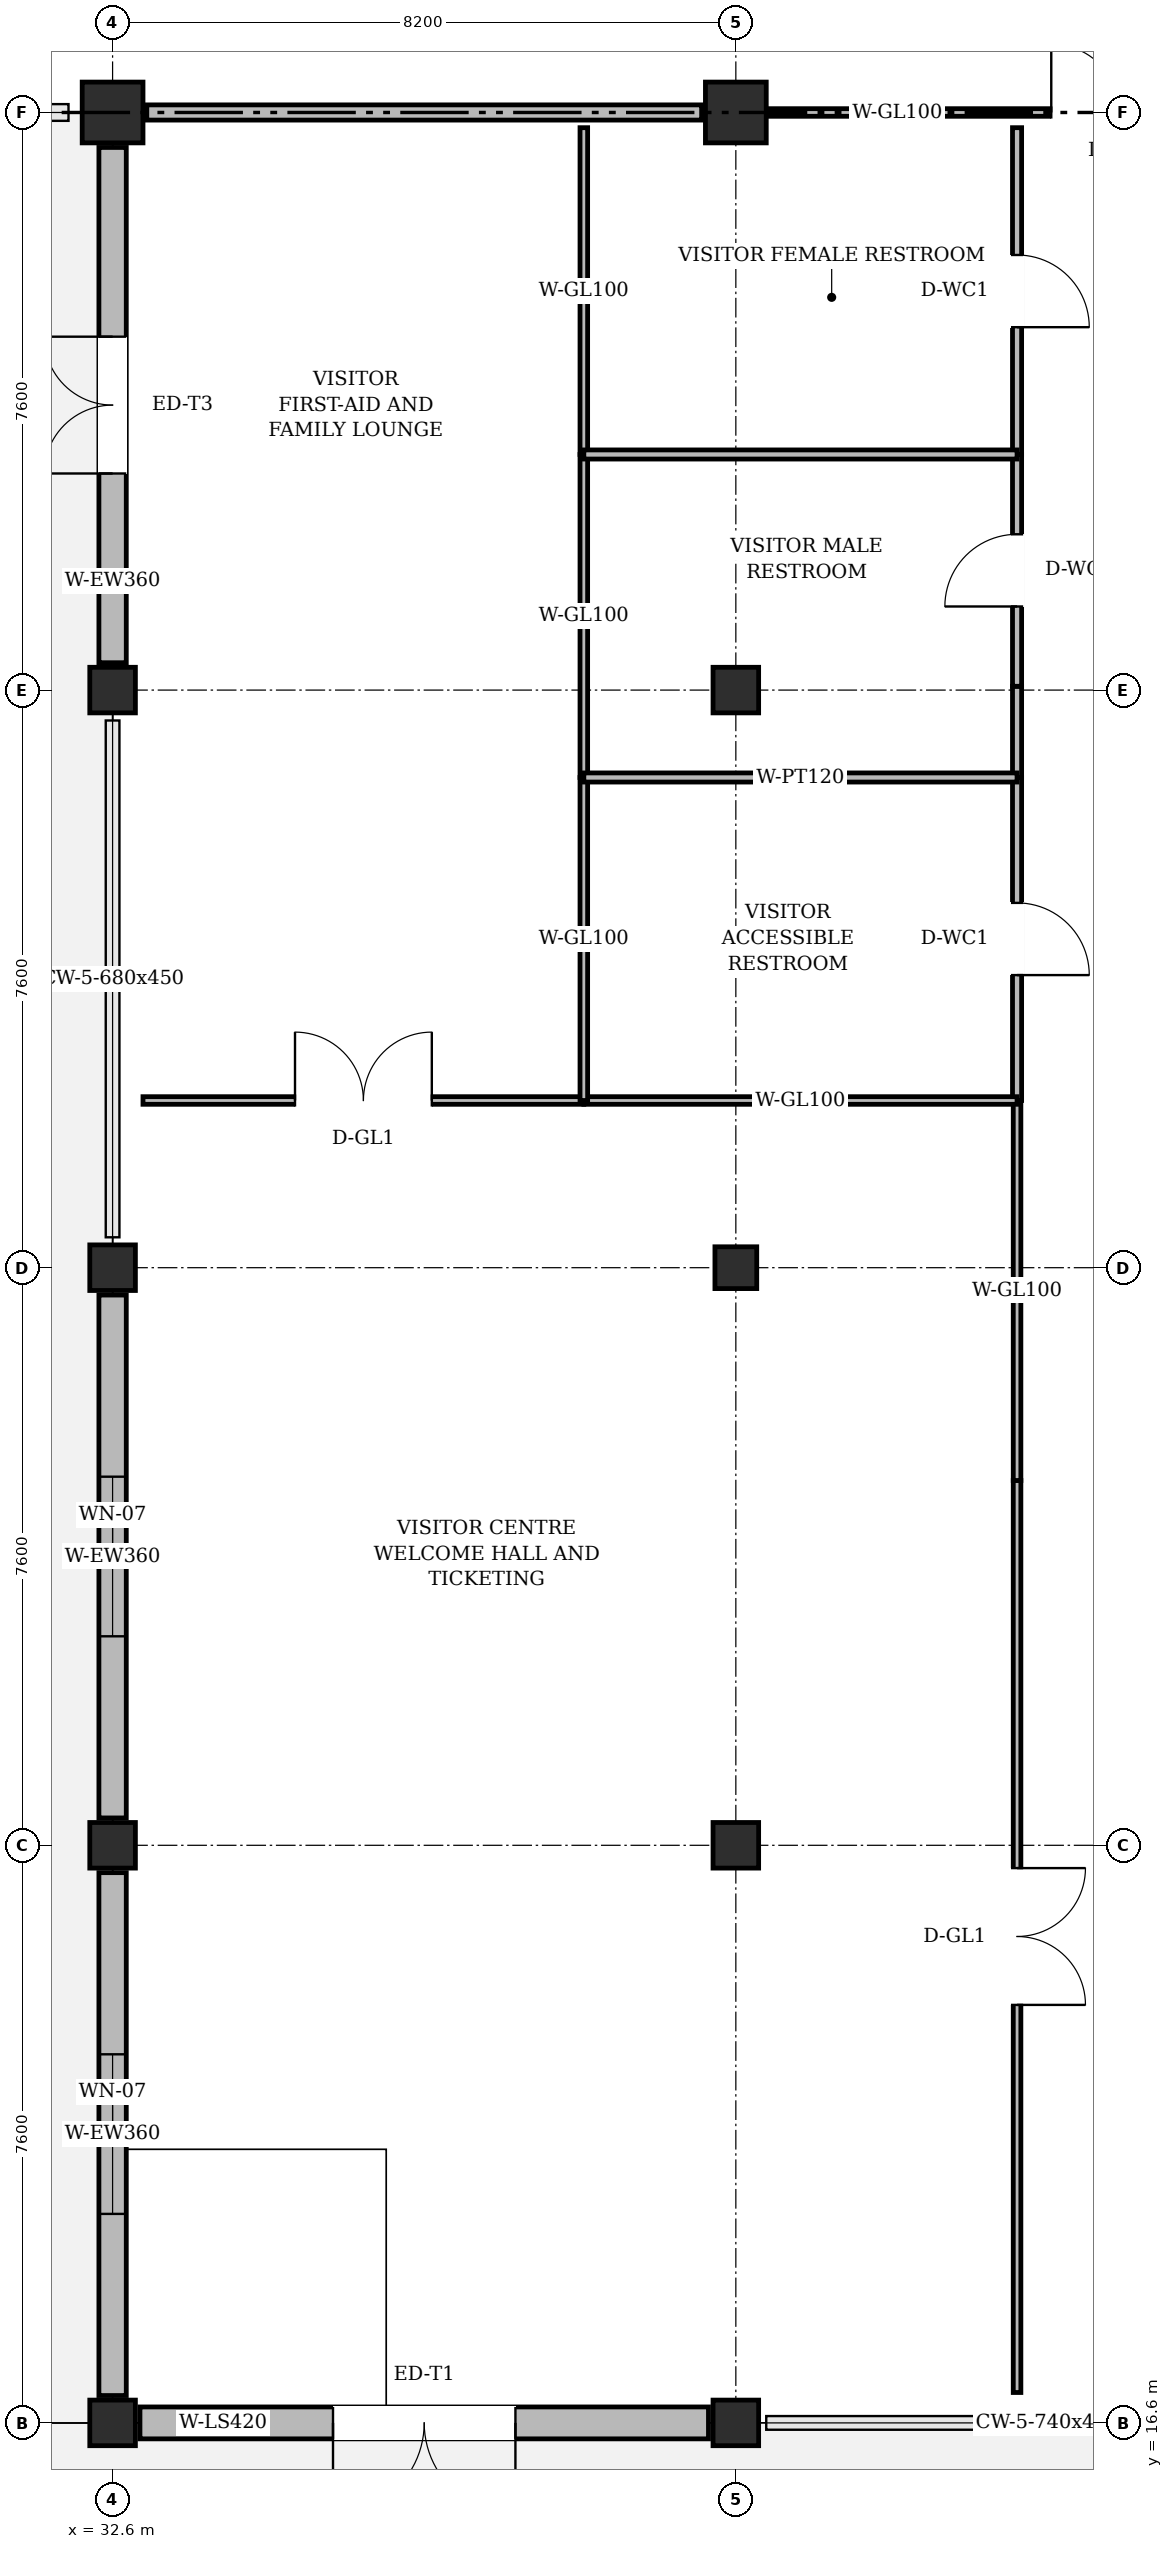
"""IFC4 building model, lengths in metres.
Left out: names, types, materials, properties, quantities, classifications, styles, units other than length and angle.
Written with IfcOpenShell. Run it as: python <this file> out.ifc"""

import sys

from ifc_helpers import new_model, si_unit, direction, frame, frame_2d, origin, origin_2d, place, context, subcontext, project, spatial, rectangle, circle, extrude, element, fill, save


model = new_model("IFC4")
c1 = context("Model", 3, precision=1e-05, world=origin(), true_north=direction((0.0, 1.0)))
c2 = subcontext(c1, "Body", "Model", "MODEL_VIEW")
j1 = project(units=[si_unit("LENGTHUNIT", "METRE"), si_unit("PLANEANGLEUNIT", "RADIAN")], contexts=[c1])
p1 = place(None, origin())
s1 = spatial("IfcSite", under=j1, at=p1, CompositionType="ELEMENT")
p2 = place(p1, origin())
s2 = spatial("IfcBuilding", under=s1, at=p2, CompositionType="ELEMENT")
p3 = place(p2, origin())
s3 = spatial("IfcBuildingStorey", under=s2, at=p3, CompositionType="ELEMENT", Elevation=0.0)
for number, where, z_axis, x_axis in (
    (1, (32.6, 16.6, 0.0), (0.0, 0.0, 1.0), (1.0, 0.0, 0.0)),
    (2, (32.6, 24.2, 0.0), (0.0, 0.0, 1.0), (1.0, 0.0, 0.0)),
    (3, (32.6, 31.8, 0.0), (0.0, 0.0, 1.0), (1.0, 0.0, 0.0)),
    (4, (32.6, 39.4, 0.0), (0.0, 0.0, 1.0), (1.0, 0.0, 0.0)),
):
    element("IfcColumn", number, at=place(p3, frame(where, z_axis=z_axis, x_axis=x_axis)), inside=s3, PredefinedType="COLUMN", context=c2, shape_type="SweptSolid", body=[
        extrude(rectangle(XDim=0.6, YDim=0.6, at=origin_2d()), origin(), (0.0, 0.0, 1.0), 5.1),
    ])
p4 = place(p3, frame((32.6, 47.0, 0.0), z_axis=(0.0, 0.0, 1.0), x_axis=(1.0, 0.0, 0.0)))
e5 = element("IfcColumn", 5, at=p4, inside=s3, PredefinedType="COLUMN", context=c2, shape_type="SweptSolid", body=[
    extrude(circle(Radius=0.4, at=origin_2d()), origin(), (0.0, 0.0, 1.0), 5.1),
])
for number, where, z_axis, x_axis in (
    (6, (40.8, 16.6, 0.0), (0.0, 0.0, 1.0), (1.0, 0.0, 0.0)),
    (7, (40.8, 24.2, 0.0), (0.0, 0.0, 1.0), (1.0, 0.0, 0.0)),
):
    element("IfcColumn", number, at=place(p3, frame(where, z_axis=z_axis, x_axis=x_axis)), inside=s3, PredefinedType="COLUMN", context=c2, shape_type="SweptSolid", body=[
        extrude(rectangle(XDim=0.6, YDim=0.6, at=origin_2d()), origin(), (0.0, 0.0, 1.0), 5.1),
    ])
p5 = place(p3, frame((40.8, 31.8, 0.0), z_axis=(0.0, 0.0, 1.0), x_axis=(1.0, 0.0, 0.0)))
e8 = element("IfcColumn", 8, at=p5, inside=s3, PredefinedType="COLUMN", context=c2, shape_type="SweptSolid", body=[
    extrude(rectangle(XDim=0.55, YDim=0.55, at=origin_2d()), origin(), (0.0, 0.0, 1.0), 5.1),
])
p6 = place(p3, frame((40.8, 39.4, 0.0), z_axis=(0.0, 0.0, 1.0), x_axis=(1.0, 0.0, 0.0)))
e9 = element("IfcColumn", 9, at=p6, inside=s3, PredefinedType="COLUMN", context=c2, shape_type="SweptSolid", body=[
    extrude(rectangle(XDim=0.6, YDim=0.6, at=origin_2d()), origin(), (0.0, 0.0, 1.0), 5.1),
])
p7 = place(p3, frame((40.8, 47.0, 0.0), z_axis=(0.0, 0.0, 1.0), x_axis=(1.0, 0.0, 0.0)))
e10 = element("IfcColumn", 10, at=p7, inside=s3, PredefinedType="COLUMN", context=c2, shape_type="SweptSolid", body=[
    extrude(circle(Radius=0.4, at=origin_2d()), origin(), (0.0, 0.0, 1.0), 5.1),
])
p8 = place(p3, frame((32.96, 16.6, 0.0), z_axis=(0.0, 0.0, 1.0), x_axis=(1.0, 0.0, 0.0)))
e11 = element("IfcWall", 11, at=p8, inside=s3, PredefinedType="SOLIDWALL", context=c2, shape_type="SweptSolid", body=[
    extrude(rectangle(XDim=7.48, YDim=0.42, at=frame_2d((3.74, 0.0))), origin(), (0.0, 0.0, 1.0), 4.335),
])
p9 = place(p8, frame((2.54, 0.0, 0.0)))
e12 = element("IfcOpeningElement", 12, at=p9, cuts=e11, PredefinedType="OPENING", context=c2, shape_type="SweptSolid", body=[
    extrude(rectangle(XDim=2.4, YDim=2.6, at=frame_2d((1.2, 1.3))), frame((0.0, 0.222, 0.0), z_axis=(0.0, -1.0, 0.0), x_axis=(1.0, 0.0, 0.0)), (0.0, 0.0, 1.0), 0.444),
])
p10 = place(p3, frame((32.6, 46.54, 0.0), z_axis=(0.0, 0.0, 1.0), x_axis=(0.0, -1.0, 0.0)))
e13 = element("IfcWall", 13, at=p10, inside=s3, PredefinedType="SOLIDWALL", context=c2, shape_type="SweptSolid", body=[
    extrude(rectangle(XDim=6.78, YDim=0.36, at=frame_2d((3.39, 0.0))), origin(), (0.0, 0.0, 1.0), 4.465),
])
p11 = place(p10, frame((2.49, 0.0, 0.0)))
e14 = element("IfcOpeningElement", 14, at=p11, cuts=e13, PredefinedType="OPENING", context=c2, shape_type="SweptSolid", body=[
    extrude(rectangle(XDim=1.8, YDim=2.2, at=frame_2d((0.9, 1.1))), frame((0.0, 0.192, 0.0), z_axis=(0.0, -1.0, 0.0), x_axis=(1.0, 0.0, 0.0)), (0.0, 0.0, 1.0), 0.384),
])
p12 = place(p3, frame((32.6, 31.44, 0.0), z_axis=(0.0, 0.0, 1.0), x_axis=(0.0, -1.0, 0.0)))
e15 = element("IfcWall", 15, at=p12, inside=s3, PredefinedType="SOLIDWALL", context=c2, shape_type="SweptSolid", body=[
    extrude(rectangle(XDim=6.88, YDim=0.36, at=frame_2d((3.44, 0.0))), origin(), (0.0, 0.0, 1.0), 4.465),
])
p13 = place(p12, frame((2.39, 0.0, 0.95)))
e16 = element("IfcOpeningElement", 16, at=p13, cuts=e15, PredefinedType="OPENING", context=c2, shape_type="SweptSolid", body=[
    extrude(rectangle(XDim=2.1, YDim=1.95, at=frame_2d((1.05, 0.975))), frame((0.0, 0.192, 0.0), z_axis=(0.0, -1.0, 0.0), x_axis=(1.0, 0.0, 0.0)), (0.0, 0.0, 1.0), 0.384),
])
p14 = place(p3, frame((32.6, 23.84, 0.0), z_axis=(0.0, 0.0, 1.0), x_axis=(0.0, -1.0, 0.0)))
e17 = element("IfcWall", 17, at=p14, inside=s3, PredefinedType="SOLIDWALL", context=c2, shape_type="SweptSolid", body=[
    extrude(rectangle(XDim=6.88, YDim=0.36, at=frame_2d((3.44, 0.0))), origin(), (0.0, 0.0, 1.0), 4.465),
])
p15 = place(p14, frame((2.39, 0.0, 0.95)))
e18 = element("IfcOpeningElement", 18, at=p15, cuts=e17, PredefinedType="OPENING", context=c2, shape_type="SweptSolid", body=[
    extrude(rectangle(XDim=2.1, YDim=1.95, at=frame_2d((1.05, 0.975))), frame((0.0, 0.192, 0.0), z_axis=(0.0, -1.0, 0.0), x_axis=(1.0, 0.0, 0.0)), (0.0, 0.0, 1.0), 0.384),
])
p16 = place(p3, frame((33.05, 47.0, 0.0), z_axis=(0.0, 0.0, 1.0), x_axis=(1.0, 0.0, 0.0)))
e19 = element("IfcWall", 19, at=p16, inside=s3, PredefinedType="PARTITIONING", context=c2, shape_type="SweptSolid", body=[
    extrude(rectangle(XDim=7.3, YDim=0.2, at=frame_2d((3.65, 0.0))), origin(), (0.0, 0.0, 1.0), 4.335),
])
p17 = place(p3, frame((41.25, 47.0, 0.0), z_axis=(0.0, 0.0, 1.0), x_axis=(1.0, 0.0, 0.0)))
e20 = element("IfcWall", 20, at=p17, inside=s3, PredefinedType="PARTITIONING", context=c2, shape_type="SweptSolid", body=[
    extrude(rectangle(XDim=7.3, YDim=0.1, at=frame_2d((3.65, 0.0))), origin(), (0.0, 0.0, 1.0), 4.335),
])
p18 = place(p17, frame((3.7, 0.0, 0.0)))
e21 = element("IfcOpeningElement", 21, at=p18, cuts=e20, PredefinedType="OPENING", context=c2, shape_type="SweptSolid", body=[
    extrude(rectangle(XDim=1.8, YDim=2.4, at=frame_2d((0.9, 1.2))), frame((0.0, 0.062, 0.0), z_axis=(0.0, -1.0, 0.0), x_axis=(1.0, 0.0, 0.0)), (0.0, 0.0, 1.0), 0.124),
])
p19 = place(p3, frame((44.5, 17.0, 0.0), z_axis=(0.0, 0.0, 1.0), x_axis=(0.0, 1.0, 0.0)))
e22 = element("IfcWall", 22, at=p19, inside=s3, PredefinedType="PARTITIONING", context=c2, shape_type="SweptSolid", body=[
    extrude(rectangle(XDim=12.0, YDim=0.1, at=frame_2d((6.0, 0.0))), origin(), (0.0, 0.0, 1.0), 5.005),
])
p20 = place(p19, frame((5.1, 0.0, 0.0)))
e23 = element("IfcOpeningElement", 23, at=p20, cuts=e22, PredefinedType="OPENING", context=c2, shape_type="SweptSolid", body=[
    extrude(rectangle(XDim=1.8, YDim=2.4, at=frame_2d((0.9, 1.2))), frame((0.0, 0.062, 0.0), z_axis=(0.0, -1.0, 0.0), x_axis=(1.0, 0.0, 0.0)), (0.0, 0.0, 1.0), 0.124),
])
p21 = place(p3, frame((44.5, 29.0, 0.0), z_axis=(0.0, 0.0, 1.0), x_axis=(0.0, 1.0, 0.0)))
e24 = element("IfcWall", 24, at=p21, inside=s3, PredefinedType="PARTITIONING", context=c2, shape_type="SweptSolid", body=[
    extrude(rectangle(XDim=5.0, YDim=0.1, at=frame_2d((2.5, 0.0))), origin(), (0.0, 0.0, 1.0), 5.005),
])
p22 = place(p3, frame((44.5, 34.0, 0.0), z_axis=(0.0, 0.0, 1.0), x_axis=(0.0, 1.0, 0.0)))
e25 = element("IfcWall", 25, at=p22, inside=s3, PredefinedType="PARTITIONING", context=c2, shape_type="SweptSolid", body=[
    extrude(rectangle(XDim=4.25, YDim=0.12, at=frame_2d((2.125, 0.0))), origin(), (0.0, 0.0, 1.0), 5.005),
])
p23 = place(p22, frame((1.65, 0.0, 0.0)))
e26 = element("IfcOpeningElement", 26, at=p23, cuts=e25, PredefinedType="OPENING", context=c2, shape_type="SweptSolid", body=[
    extrude(rectangle(XDim=0.95, YDim=2.15, at=frame_2d((0.475, 1.075))), frame((0.0, 0.072, 0.0), z_axis=(0.0, -1.0, 0.0), x_axis=(1.0, 0.0, 0.0)), (0.0, 0.0, 1.0), 0.144),
])
p24 = place(p3, frame((44.5, 38.25, 0.0), z_axis=(0.0, 0.0, 1.0), x_axis=(0.0, 1.0, 0.0)))
e27 = element("IfcWall", 27, at=p24, inside=s3, PredefinedType="PARTITIONING", context=c2, shape_type="SweptSolid", body=[
    extrude(rectangle(XDim=1.2, YDim=0.12, at=frame_2d((0.6, 0.0))), origin(), (0.0, 0.0, 1.0), 5.005),
])
p25 = place(p3, frame((44.5, 39.45, 0.0), z_axis=(0.0, 0.0, 1.0), x_axis=(0.0, 1.0, 0.0)))
e28 = element("IfcWall", 28, at=p25, inside=s3, PredefinedType="PARTITIONING", context=c2, shape_type="SweptSolid", body=[
    extrude(rectangle(XDim=3.05, YDim=0.12, at=frame_2d((1.525, 0.0))), origin(), (0.0, 0.0, 1.0), 5.005),
])
p26 = place(p25, frame((1.05, 0.0, 0.0)))
e29 = element("IfcOpeningElement", 29, at=p26, cuts=e28, PredefinedType="OPENING", context=c2, shape_type="SweptSolid", body=[
    extrude(rectangle(XDim=0.95, YDim=2.15, at=frame_2d((0.475, 1.075))), frame((0.0, 0.072, 0.0), z_axis=(0.0, -1.0, 0.0), x_axis=(1.0, 0.0, 0.0)), (0.0, 0.0, 1.0), 0.144),
])
p27 = place(p3, frame((44.5, 42.5, 0.0), z_axis=(0.0, 0.0, 1.0), x_axis=(0.0, 1.0, 0.0)))
e30 = element("IfcWall", 30, at=p27, inside=s3, PredefinedType="PARTITIONING", context=c2, shape_type="SweptSolid", body=[
    extrude(rectangle(XDim=4.3, YDim=0.12, at=frame_2d((2.15, 0.0))), origin(), (0.0, 0.0, 1.0), 5.005),
])
p28 = place(p27, frame((1.675, 0.0, 0.0)))
e31 = element("IfcOpeningElement", 31, at=p28, cuts=e30, PredefinedType="OPENING", context=c2, shape_type="SweptSolid", body=[
    extrude(rectangle(XDim=0.95, YDim=2.15, at=frame_2d((0.475, 1.075))), frame((0.0, 0.072, 0.0), z_axis=(0.0, -1.0, 0.0), x_axis=(1.0, 0.0, 0.0)), (0.0, 0.0, 1.0), 0.144),
])
p29 = place(p3, frame((33.0, 34.0, 0.0), z_axis=(0.0, 0.0, 1.0), x_axis=(1.0, 0.0, 0.0)))
e32 = element("IfcWall", 32, at=p29, inside=s3, PredefinedType="PARTITIONING", context=c2, shape_type="SweptSolid", body=[
    extrude(rectangle(XDim=5.8, YDim=0.1, at=frame_2d((2.9, 0.0))), origin(), (0.0, 0.0, 1.0), 5.005),
])
p30 = place(p29, frame((2.0, 0.0, 0.0)))
e33 = element("IfcOpeningElement", 33, at=p30, cuts=e32, PredefinedType="OPENING", context=c2, shape_type="SweptSolid", body=[
    extrude(rectangle(XDim=1.8, YDim=2.4, at=frame_2d((0.9, 1.2))), frame((0.0, 0.062, 0.0), z_axis=(0.0, -1.0, 0.0), x_axis=(1.0, 0.0, 0.0)), (0.0, 0.0, 1.0), 0.124),
])
p31 = place(p3, frame((38.8, 34.0, 0.0), z_axis=(0.0, 0.0, 1.0), x_axis=(1.0, 0.0, 0.0)))
e34 = element("IfcWall", 34, at=p31, inside=s3, PredefinedType="PARTITIONING", context=c2, shape_type="SweptSolid", body=[
    extrude(rectangle(XDim=5.7, YDim=0.1, at=frame_2d((2.85, 0.0))), origin(), (0.0, 0.0, 1.0), 5.005),
])
for number, where, z_axis, x_axis in (
    (35, (38.8, 38.25, 0.0), (0.0, 0.0, 1.0), (0.0, -1.0, 0.0)),
    (36, (38.8, 42.5, 0.0), (0.0, 0.0, 1.0), (0.0, -1.0, 0.0)),
):
    element("IfcWall", number, at=place(p3, frame(where, z_axis=z_axis, x_axis=x_axis)), inside=s3, PredefinedType="PARTITIONING", context=c2, shape_type="SweptSolid", body=[
        extrude(rectangle(XDim=4.25, YDim=0.1, at=frame_2d((2.125, 0.0))), origin(), (0.0, 0.0, 1.0), 5.005),
    ])
p32 = place(p3, frame((38.8, 46.8, 0.0), z_axis=(0.0, 0.0, 1.0), x_axis=(0.0, -1.0, 0.0)))
e37 = element("IfcWall", 37, at=p32, inside=s3, PredefinedType="PARTITIONING", context=c2, shape_type="SweptSolid", body=[
    extrude(rectangle(XDim=4.3, YDim=0.1, at=frame_2d((2.15, 0.0))), origin(), (0.0, 0.0, 1.0), 5.005),
])
for number, where, z_axis, x_axis in (
    (38, (38.8, 38.25, 0.0), (0.0, 0.0, 1.0), (1.0, 0.0, 0.0)),
    (39, (38.8, 42.5, 0.0), (0.0, 0.0, 1.0), (1.0, 0.0, 0.0)),
):
    element("IfcWall", number, at=place(p3, frame(where, z_axis=z_axis, x_axis=x_axis)), inside=s3, PredefinedType="PARTITIONING", context=c2, shape_type="SweptSolid", body=[
        extrude(rectangle(XDim=5.7, YDim=0.12, at=frame_2d((2.85, 0.0))), origin(), (0.0, 0.0, 1.0), 5.005),
    ])
p33 = place(p9, frame((2.4, 0.0, 0.0), z_axis=(0.0, 0.0, 1.0), x_axis=(-1.0, 0.0, 0.0)))
e40 = element("IfcDoor", 40, at=p33, inside=s3, OperationType="DOUBLE_DOOR_SINGLE_SWING", PredefinedType="DOOR", context=c2, shape_type="SweptSolid", body=[
    extrude(rectangle(XDim=2.4, YDim=2.6, at=frame_2d((1.2, 1.3))), frame((0.0, 0.025, 0.0), z_axis=(0.0, -1.0, 0.0), x_axis=(1.0, 0.0, 0.0)), (0.0, 0.0, 1.0), 0.05),
])
fill(e12, e40)
p34 = place(p11, frame((1.8, 0.0, 0.0), z_axis=(0.0, 0.0, 1.0), x_axis=(-1.0, 0.0, 0.0)))
e41 = element("IfcDoor", 41, at=p34, inside=s3, OperationType="DOUBLE_DOOR_SINGLE_SWING", PredefinedType="DOOR", context=c2, shape_type="SweptSolid", body=[
    extrude(rectangle(XDim=1.8, YDim=2.2, at=frame_2d((0.9, 1.1))), frame((0.0, 0.025, 0.0), z_axis=(0.0, -1.0, 0.0), x_axis=(1.0, 0.0, 0.0)), (0.0, 0.0, 1.0), 0.05),
])
fill(e14, e41)
p35 = place(p13, origin())
e42 = element("IfcWindow", 42, at=p35, inside=s3, PartitioningType="DOUBLE_PANEL_VERTICAL", PredefinedType="WINDOW", context=c2, shape_type="SweptSolid", body=[
    extrude(rectangle(XDim=2.1, YDim=1.95, at=frame_2d((1.05, 0.975))), frame((0.0, 0.03, 0.0), z_axis=(0.0, -1.0, 0.0), x_axis=(1.0, 0.0, 0.0)), (0.0, 0.0, 1.0), 0.06),
])
fill(e16, e42)
p36 = place(p15, origin())
e43 = element("IfcWindow", 43, at=p36, inside=s3, PartitioningType="DOUBLE_PANEL_VERTICAL", PredefinedType="WINDOW", context=c2, shape_type="SweptSolid", body=[
    extrude(rectangle(XDim=2.1, YDim=1.95, at=frame_2d((1.05, 0.975))), frame((0.0, 0.03, 0.0), z_axis=(0.0, -1.0, 0.0), x_axis=(1.0, 0.0, 0.0)), (0.0, 0.0, 1.0), 0.06),
])
fill(e18, e43)
p37 = place(p18, origin())
e44 = element("IfcDoor", 44, at=p37, inside=s3, OperationType="DOUBLE_DOOR_SINGLE_SWING", PredefinedType="DOOR", context=c2, shape_type="SweptSolid", body=[
    extrude(rectangle(XDim=1.8, YDim=2.4, at=frame_2d((0.9, 1.2))), frame((0.0, 0.025, 0.0), z_axis=(0.0, -1.0, 0.0), x_axis=(1.0, 0.0, 0.0)), (0.0, 0.0, 1.0), 0.05),
])
fill(e21, e44)
p38 = place(p20, frame((1.8, 0.0, 0.0), z_axis=(0.0, 0.0, 1.0), x_axis=(-1.0, 0.0, 0.0)))
e45 = element("IfcDoor", 45, at=p38, inside=s3, OperationType="DOUBLE_DOOR_SINGLE_SWING", PredefinedType="DOOR", context=c2, shape_type="SweptSolid", body=[
    extrude(rectangle(XDim=1.8, YDim=2.4, at=frame_2d((0.9, 1.2))), frame((0.0, 0.025, 0.0), z_axis=(0.0, -1.0, 0.0), x_axis=(1.0, 0.0, 0.0)), (0.0, 0.0, 1.0), 0.05),
])
fill(e23, e45)
p39 = place(p23, frame((0.95, 0.0, 0.0), z_axis=(0.0, 0.0, 1.0), x_axis=(-1.0, 0.0, 0.0)))
e46 = element("IfcDoor", 46, at=p39, inside=s3, OperationType="SINGLE_SWING_RIGHT", PredefinedType="DOOR", context=c2, shape_type="SweptSolid", body=[
    extrude(rectangle(XDim=0.95, YDim=2.15, at=frame_2d((0.475, 1.075))), frame((0.0, 0.025, 0.0), z_axis=(0.0, -1.0, 0.0), x_axis=(1.0, 0.0, 0.0)), (0.0, 0.0, 1.0), 0.05),
])
fill(e26, e46)
p40 = place(p26, origin())
e47 = element("IfcDoor", 47, at=p40, inside=s3, OperationType="SINGLE_SWING_LEFT", PredefinedType="DOOR", context=c2, shape_type="SweptSolid", body=[
    extrude(rectangle(XDim=0.95, YDim=2.15, at=frame_2d((0.475, 1.075))), frame((0.0, 0.025, 0.0), z_axis=(0.0, -1.0, 0.0), x_axis=(1.0, 0.0, 0.0)), (0.0, 0.0, 1.0), 0.05),
])
fill(e29, e47)
p41 = place(p28, frame((0.95, 0.0, 0.0), z_axis=(0.0, 0.0, 1.0), x_axis=(-1.0, 0.0, 0.0)))
e48 = element("IfcDoor", 48, at=p41, inside=s3, OperationType="SINGLE_SWING_RIGHT", PredefinedType="DOOR", context=c2, shape_type="SweptSolid", body=[
    extrude(rectangle(XDim=0.95, YDim=2.15, at=frame_2d((0.475, 1.075))), frame((0.0, 0.025, 0.0), z_axis=(0.0, -1.0, 0.0), x_axis=(1.0, 0.0, 0.0)), (0.0, 0.0, 1.0), 0.05),
])
fill(e31, e48)
p42 = place(p30, origin())
e49 = element("IfcDoor", 49, at=p42, inside=s3, OperationType="DOUBLE_DOOR_SINGLE_SWING", PredefinedType="DOOR", context=c2, shape_type="SweptSolid", body=[
    extrude(rectangle(XDim=1.8, YDim=2.4, at=frame_2d((0.9, 1.2))), frame((0.0, 0.025, 0.0), z_axis=(0.0, -1.0, 0.0), x_axis=(1.0, 0.0, 0.0)), (0.0, 0.0, 1.0), 0.05),
])
fill(e33, e49)
save(model, sys.argv[1])
